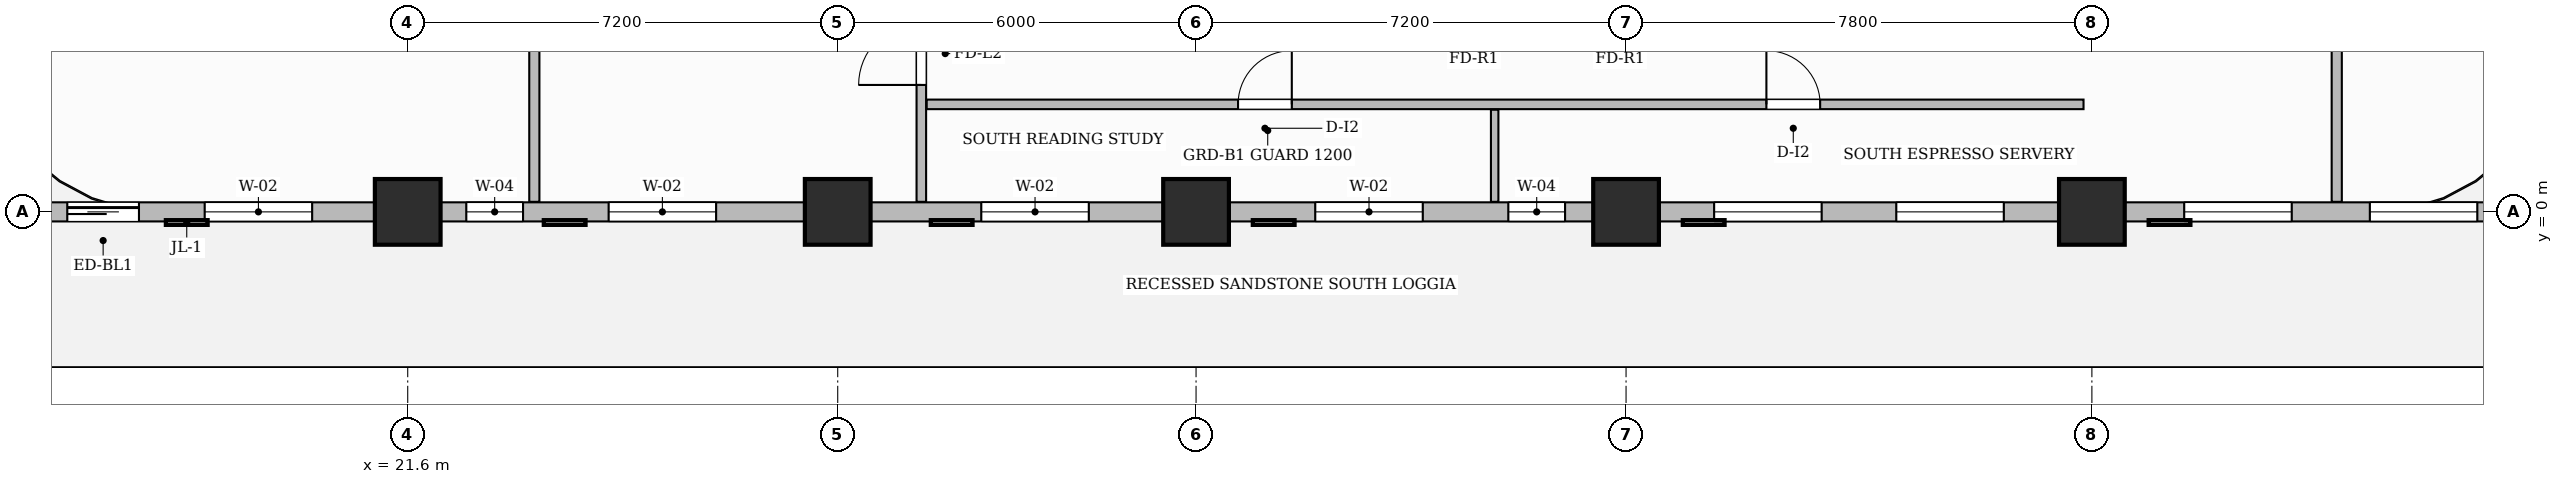
"""IFC4 building model, lengths in metres.
Left out: names, types, materials, properties, quantities, classifications, styles, units other than length and angle.
Written with IfcOpenShell. Run it as: python <this file> out.ifc"""

import sys

from ifc_helpers import new_model, si_unit, direction, frame, frame_2d, origin, origin_2d, place, context, subcontext, project, spatial, rectangle, extrude, source, transform, mapped, element, fill, save


model = new_model("IFC4")
c1 = context("Model", 3, precision=1e-05, world=origin(), true_north=direction((0.0, 1.0)))
c2 = subcontext(c1, "Body", "Model", "MODEL_VIEW")
j1 = project(units=[si_unit("LENGTHUNIT", "METRE"), si_unit("PLANEANGLEUNIT", "RADIAN")], contexts=[c1])
p1 = place(None, origin())
s1 = spatial("IfcSite", under=j1, at=p1, CompositionType="ELEMENT")
p2 = place(p1, origin())
s2 = spatial("IfcBuilding", under=s1, at=p2, CompositionType="ELEMENT")
p3 = place(p2, frame((0.0, 0.0, 47.2)))
s3 = spatial("IfcBuildingStorey", under=s2, at=p3, CompositionType="ELEMENT", Elevation=47.2)
m1 = source(origin(), c2, "Body", "SweptSolid", [
    extrude(rectangle(XDim=1.1, YDim=1.1, at=origin_2d()), origin(), (0.0, 0.0, 1.0), 3.7),
])
for number, where, z_axis, x_axis in (
    (1, (21.6, 0.0, 0.0), (0.0, 0.0, 1.0), (1.0, 0.0, 0.0)),
    (2, (28.8, 0.0, 0.0), (0.0, 0.0, 1.0), (1.0, 0.0, 0.0)),
    (3, (34.8, 0.0, 0.0), (0.0, 0.0, 1.0), (1.0, 0.0, 0.0)),
    (4, (42.0, 0.0, 0.0), (0.0, 0.0, 1.0), (1.0, 0.0, 0.0)),
    (5, (49.8, 0.0, 0.0), (0.0, 0.0, 1.0), (1.0, 0.0, 0.0)),
):
    element("IfcColumn", number, at=place(p3, frame(where, z_axis=z_axis, x_axis=x_axis)), inside=s3, PredefinedType="COLUMN", context=c2, shape_type="MappedRepresentation", body=[
        mapped(m1, transform((0.0, 0.0, 0.0), scale=1.0)),
    ])
p4 = place(p3, frame((30.2, 0.168, 0.0), z_axis=(0.0, 0.0, 1.0), x_axis=(0.0, 1.0, 0.0)))
e6 = element("IfcWall", 6, at=p4, inside=s3, PredefinedType="PARTITIONING", context=c2, shape_type="SweptSolid", body=[
    extrude(rectangle(XDim=9.492, YDim=0.16, at=frame_2d((4.746, 0.0))), origin(), (0.0, 0.0, 1.0), 3.45),
])
p5 = place(p4, frame((1.957, 0.0, 0.0)))
e7 = element("IfcOpeningElement", 7, at=p5, cuts=e6, PredefinedType="OPENING", context=c2, shape_type="SweptSolid", body=[
    extrude(rectangle(XDim=1.05, YDim=2.15, at=frame_2d((0.525, 1.075))), frame((0.0, 0.09, 0.0), z_axis=(0.0, -1.0, 0.0), x_axis=(1.0, 0.0, 0.0)), (0.0, 0.0, 1.0), 0.18),
])
p6 = place(p3, frame((30.29, 1.8, 0.0), z_axis=(0.0, 0.0, 1.0), x_axis=(1.0, 0.0, 0.0)))
e8 = element("IfcWall", 8, at=p6, inside=s3, PredefinedType="PARTITIONING", context=c2, shape_type="SweptSolid", body=[
    extrude(rectangle(XDim=19.37, YDim=0.16, at=frame_2d((9.685, 0.0))), origin(), (0.0, 0.0, 1.0), 3.45),
])
p7 = place(p6, frame((5.213, 0.0, 0.0)))
e9 = element("IfcOpeningElement", 9, at=p7, cuts=e8, PredefinedType="OPENING", context=c2, shape_type="SweptSolid", body=[
    extrude(rectangle(XDim=0.9, YDim=2.15, at=frame_2d((0.45, 1.075))), frame((0.0, 0.09, 0.0), z_axis=(0.0, -1.0, 0.0), x_axis=(1.0, 0.0, 0.0)), (0.0, 0.0, 1.0), 0.18),
])
p8 = place(p6, frame((14.06, 0.0, 0.0)))
e10 = element("IfcOpeningElement", 10, at=p8, cuts=e8, PredefinedType="OPENING", context=c2, shape_type="SweptSolid", body=[
    extrude(rectangle(XDim=0.9, YDim=2.15, at=frame_2d((0.45, 1.075))), frame((0.0, 0.09, 0.0), z_axis=(0.0, -1.0, 0.0), x_axis=(1.0, 0.0, 0.0)), (0.0, 0.0, 1.0), 0.18),
])
p9 = place(p3, frame((39.8, 0.168, 0.0), z_axis=(0.0, 0.0, 1.0), x_axis=(0.0, 1.0, 0.0)))
e11 = element("IfcWall", 11, at=p9, inside=s3, PredefinedType="PARTITIONING", context=c2, shape_type="SweptSolid", body=[
    extrude(rectangle(XDim=1.542, YDim=0.125, at=frame_2d((0.771, 0.0))), origin(), (0.0, 0.0, 1.0), 3.45),
])
p10 = place(p3, frame((53.9, 0.168, 0.0), z_axis=(0.0, 0.0, 1.0), x_axis=(0.0, 1.0, 0.0)))
e12 = element("IfcWall", 12, at=p10, inside=s3, PredefinedType="PARTITIONING", context=c2, shape_type="SweptSolid", body=[
    extrude(rectangle(XDim=14.142, YDim=0.17, at=frame_2d((7.071, 0.0))), origin(), (0.0, 0.0, 1.0), 3.035),
])
p11 = place(p3, frame((23.72, 0.168, 0.0), z_axis=(0.0, 0.0, 1.0), x_axis=(0.0, 1.0, 0.0)))
e13 = element("IfcWall", 13, at=p11, inside=s3, PredefinedType="PARTITIONING", context=c2, shape_type="SweptSolid", body=[
    extrude(rectangle(XDim=9.492, YDim=0.17, at=frame_2d((4.746, 0.0))), origin(), (0.0, 0.0, 1.0), 3.45),
])
p12 = place(p3, frame((14.4, 0.0, 0.0), z_axis=(0.0, 0.0, 1.0), x_axis=(1.0, 0.0, 0.0)))
e14 = element("IfcWall", 14, at=p12, inside=s3, PredefinedType="SOLIDWALL", context=c2, shape_type="SweptSolid", body=[
    extrude(rectangle(XDim=43.2, YDim=0.32, at=frame_2d((21.6, 0.0))), origin(), (0.0, 0.0, 1.0), 2.885),
])
p13 = place(p12, frame((1.5, 0.0, 0.0)))
e15 = element("IfcOpeningElement", 15, at=p13, cuts=e14, PredefinedType="OPENING", context=c2, shape_type="SweptSolid", body=[
    extrude(rectangle(XDim=1.2, YDim=2.2, at=frame_2d((0.6, 1.1))), frame((0.0, 0.17, 0.0), z_axis=(0.0, -1.0, 0.0), x_axis=(1.0, 0.0, 0.0)), (0.0, 0.0, 1.0), 0.34),
])
p14 = place(p12, frame((3.8, 0.0, 0.8)))
e16 = element("IfcOpeningElement", 16, at=p14, cuts=e14, PredefinedType="OPENING", context=c2, shape_type="SweptSolid", body=[
    extrude(rectangle(XDim=1.8, YDim=1.85, at=frame_2d((0.9, 0.925))), frame((0.0, 0.17, 0.0), z_axis=(0.0, -1.0, 0.0), x_axis=(1.0, 0.0, 0.0)), (0.0, 0.0, 1.0), 0.34),
])
p15 = place(p12, frame((8.181, 0.0, 0.8)))
e17 = element("IfcOpeningElement", 17, at=p15, cuts=e14, PredefinedType="OPENING", context=c2, shape_type="SweptSolid", body=[
    extrude(rectangle(XDim=0.95, YDim=1.75, at=frame_2d((0.475, 0.875))), frame((0.0, 0.17, 0.0), z_axis=(0.0, -1.0, 0.0), x_axis=(1.0, 0.0, 0.0)), (0.0, 0.0, 1.0), 0.34),
])
p16 = place(p12, frame((10.564, 0.0, 0.8)))
e18 = element("IfcOpeningElement", 18, at=p16, cuts=e14, PredefinedType="OPENING", context=c2, shape_type="SweptSolid", body=[
    extrude(rectangle(XDim=1.8, YDim=1.85, at=frame_2d((0.9, 0.925))), frame((0.0, 0.17, 0.0), z_axis=(0.0, -1.0, 0.0), x_axis=(1.0, 0.0, 0.0)), (0.0, 0.0, 1.0), 0.34),
])
p17 = place(p12, frame((16.804, 0.0, 0.8)))
e19 = element("IfcOpeningElement", 19, at=p17, cuts=e14, PredefinedType="OPENING", context=c2, shape_type="SweptSolid", body=[
    extrude(rectangle(XDim=1.8, YDim=1.85, at=frame_2d((0.9, 0.925))), frame((0.0, 0.17, 0.0), z_axis=(0.0, -1.0, 0.0), x_axis=(1.0, 0.0, 0.0)), (0.0, 0.0, 1.0), 0.34),
])
p18 = place(p12, frame((22.396, 0.0, 0.8)))
e20 = element("IfcOpeningElement", 20, at=p18, cuts=e14, PredefinedType="OPENING", context=c2, shape_type="SweptSolid", body=[
    extrude(rectangle(XDim=1.8, YDim=1.85, at=frame_2d((0.9, 0.925))), frame((0.0, 0.17, 0.0), z_axis=(0.0, -1.0, 0.0), x_axis=(1.0, 0.0, 0.0)), (0.0, 0.0, 1.0), 0.34),
])
p19 = place(p12, frame((25.629, 0.0, 0.8)))
e21 = element("IfcOpeningElement", 21, at=p19, cuts=e14, PredefinedType="OPENING", context=c2, shape_type="SweptSolid", body=[
    extrude(rectangle(XDim=0.95, YDim=1.75, at=frame_2d((0.475, 0.875))), frame((0.0, 0.17, 0.0), z_axis=(0.0, -1.0, 0.0), x_axis=(1.0, 0.0, 0.0)), (0.0, 0.0, 1.0), 0.34),
])
p20 = place(p12, frame((29.075, 0.0, 0.8)))
e22 = element("IfcOpeningElement", 22, at=p20, cuts=e14, PredefinedType="OPENING", context=c2, shape_type="SweptSolid", body=[
    extrude(rectangle(XDim=1.8, YDim=1.85, at=frame_2d((0.9, 0.925))), frame((0.0, 0.17, 0.0), z_axis=(0.0, -1.0, 0.0), x_axis=(1.0, 0.0, 0.0)), (0.0, 0.0, 1.0), 0.34),
])
p21 = place(p12, frame((32.125, 0.0, 0.8)))
e23 = element("IfcOpeningElement", 23, at=p21, cuts=e14, PredefinedType="OPENING", context=c2, shape_type="SweptSolid", body=[
    extrude(rectangle(XDim=1.8, YDim=1.85, at=frame_2d((0.9, 0.925))), frame((0.0, 0.17, 0.0), z_axis=(0.0, -1.0, 0.0), x_axis=(1.0, 0.0, 0.0)), (0.0, 0.0, 1.0), 0.34),
])
p22 = place(p12, frame((36.946, 0.0, 0.8)))
e24 = element("IfcOpeningElement", 24, at=p22, cuts=e14, PredefinedType="OPENING", context=c2, shape_type="SweptSolid", body=[
    extrude(rectangle(XDim=1.8, YDim=1.85, at=frame_2d((0.9, 0.925))), frame((0.0, 0.17, 0.0), z_axis=(0.0, -1.0, 0.0), x_axis=(1.0, 0.0, 0.0)), (0.0, 0.0, 1.0), 0.34),
])
p23 = place(p12, frame((40.054, 0.0, 0.8)))
e25 = element("IfcOpeningElement", 25, at=p23, cuts=e14, PredefinedType="OPENING", context=c2, shape_type="SweptSolid", body=[
    extrude(rectangle(XDim=1.8, YDim=1.85, at=frame_2d((0.9, 0.925))), frame((0.0, 0.17, 0.0), z_axis=(0.0, -1.0, 0.0), x_axis=(1.0, 0.0, 0.0)), (0.0, 0.0, 1.0), 0.34),
])
m2 = source(origin(), c2, "Body", "SweptSolid", [
    extrude(rectangle(XDim=1.05, YDim=2.15, at=frame_2d((0.525, 1.075))), frame((0.0, 0.025, 0.0), z_axis=(0.0, -1.0, 0.0), x_axis=(1.0, 0.0, 0.0)), (0.0, 0.0, 1.0), 0.05),
])
p24 = place(p5, origin())
e26 = element("IfcDoor", 26, at=p24, inside=s3, OperationType="SINGLE_SWING_LEFT", PredefinedType="DOOR", context=c2, shape_type="MappedRepresentation", body=[
    mapped(m2, transform((0.0, 0.0, 0.0), scale=1.0)),
])
fill(e7, e26)
m3 = source(origin(), c2, "Body", "SweptSolid", [
    extrude(rectangle(XDim=0.9, YDim=2.15, at=frame_2d((0.45, 1.075))), frame((0.0, 0.025, 0.0), z_axis=(0.0, -1.0, 0.0), x_axis=(1.0, 0.0, 0.0)), (0.0, 0.0, 1.0), 0.05),
])
p25 = place(p7, origin())
e27 = element("IfcDoor", 27, at=p25, inside=s3, OperationType="SINGLE_SWING_RIGHT", PredefinedType="DOOR", context=c2, shape_type="MappedRepresentation", body=[
    mapped(m3, transform((0.0, 0.0, 0.0), scale=1.0)),
])
fill(e9, e27)
p26 = place(p8, origin())
e28 = element("IfcDoor", 28, at=p26, inside=s3, OperationType="SINGLE_SWING_LEFT", PredefinedType="DOOR", context=c2, shape_type="MappedRepresentation", body=[
    mapped(m3, transform((0.0, 0.0, 0.0), scale=1.0)),
])
fill(e10, e28)
m4 = source(origin(), c2, "Body", "SweptSolid", [
    extrude(rectangle(XDim=1.2, YDim=2.2, at=frame_2d((0.6, 1.1))), frame((0.0, 0.025, 0.0), z_axis=(0.0, -1.0, 0.0), x_axis=(1.0, 0.0, 0.0)), (0.0, 0.0, 1.0), 0.05),
])
p27 = place(p13, origin())
e29 = element("IfcDoor", 29, at=p27, inside=s3, OperationType="SLIDING_TO_LEFT", PredefinedType="DOOR", context=c2, shape_type="MappedRepresentation", body=[
    mapped(m4, transform((0.0, 0.0, 0.0), scale=1.0)),
])
fill(e15, e29)
m5 = source(origin(), c2, "Body", "SweptSolid", [
    extrude(rectangle(XDim=1.8, YDim=1.85, at=frame_2d((0.9, 0.925))), frame((0.0, 0.03, 0.0), z_axis=(0.0, -1.0, 0.0), x_axis=(1.0, 0.0, 0.0)), (0.0, 0.0, 1.0), 0.06),
])
p28 = place(p14, origin())
e30 = element("IfcWindow", 30, at=p28, inside=s3, PartitioningType="DOUBLE_PANEL_VERTICAL", PredefinedType="WINDOW", context=c2, shape_type="MappedRepresentation", body=[
    mapped(m5, transform((0.0, 0.0, 0.0), scale=1.0)),
])
fill(e16, e30)
m6 = source(origin(), c2, "Body", "SweptSolid", [
    extrude(rectangle(XDim=0.95, YDim=1.75, at=frame_2d((0.475, 0.875))), frame((0.0, 0.03, 0.0), z_axis=(0.0, -1.0, 0.0), x_axis=(1.0, 0.0, 0.0)), (0.0, 0.0, 1.0), 0.06),
])
p29 = place(p15, origin())
e31 = element("IfcWindow", 31, at=p29, inside=s3, PartitioningType="SINGLE_PANEL", PredefinedType="WINDOW", context=c2, shape_type="MappedRepresentation", body=[
    mapped(m6, transform((0.0, 0.0, 0.0), scale=1.0)),
])
fill(e17, e31)
p30 = place(p16, origin())
e32 = element("IfcWindow", 32, at=p30, inside=s3, PartitioningType="DOUBLE_PANEL_VERTICAL", PredefinedType="WINDOW", context=c2, shape_type="MappedRepresentation", body=[
    mapped(m5, transform((0.0, 0.0, 0.0), scale=1.0)),
])
fill(e18, e32)
p31 = place(p17, origin())
e33 = element("IfcWindow", 33, at=p31, inside=s3, PartitioningType="DOUBLE_PANEL_VERTICAL", PredefinedType="WINDOW", context=c2, shape_type="MappedRepresentation", body=[
    mapped(m5, transform((0.0, 0.0, 0.0), scale=1.0)),
])
fill(e19, e33)
p32 = place(p18, origin())
e34 = element("IfcWindow", 34, at=p32, inside=s3, PartitioningType="DOUBLE_PANEL_VERTICAL", PredefinedType="WINDOW", context=c2, shape_type="MappedRepresentation", body=[
    mapped(m5, transform((0.0, 0.0, 0.0), scale=1.0)),
])
fill(e20, e34)
p33 = place(p19, origin())
e35 = element("IfcWindow", 35, at=p33, inside=s3, PartitioningType="SINGLE_PANEL", PredefinedType="WINDOW", context=c2, shape_type="MappedRepresentation", body=[
    mapped(m6, transform((0.0, 0.0, 0.0), scale=1.0)),
])
fill(e21, e35)
p34 = place(p20, origin())
e36 = element("IfcWindow", 36, at=p34, inside=s3, PartitioningType="DOUBLE_PANEL_VERTICAL", PredefinedType="WINDOW", context=c2, shape_type="MappedRepresentation", body=[
    mapped(m5, transform((0.0, 0.0, 0.0), scale=1.0)),
])
fill(e22, e36)
p35 = place(p21, origin())
e37 = element("IfcWindow", 37, at=p35, inside=s3, PartitioningType="DOUBLE_PANEL_VERTICAL", PredefinedType="WINDOW", context=c2, shape_type="MappedRepresentation", body=[
    mapped(m5, transform((0.0, 0.0, 0.0), scale=1.0)),
])
fill(e23, e37)
p36 = place(p22, origin())
e38 = element("IfcWindow", 38, at=p36, inside=s3, PartitioningType="DOUBLE_PANEL_VERTICAL", PredefinedType="WINDOW", context=c2, shape_type="MappedRepresentation", body=[
    mapped(m5, transform((0.0, 0.0, 0.0), scale=1.0)),
])
fill(e24, e38)
p37 = place(p23, origin())
e39 = element("IfcWindow", 39, at=p37, inside=s3, PartitioningType="DOUBLE_PANEL_VERTICAL", PredefinedType="WINDOW", context=c2, shape_type="MappedRepresentation", body=[
    mapped(m5, transform((0.0, 0.0, 0.0), scale=1.0)),
])
fill(e25, e39)
save(model, sys.argv[1])
